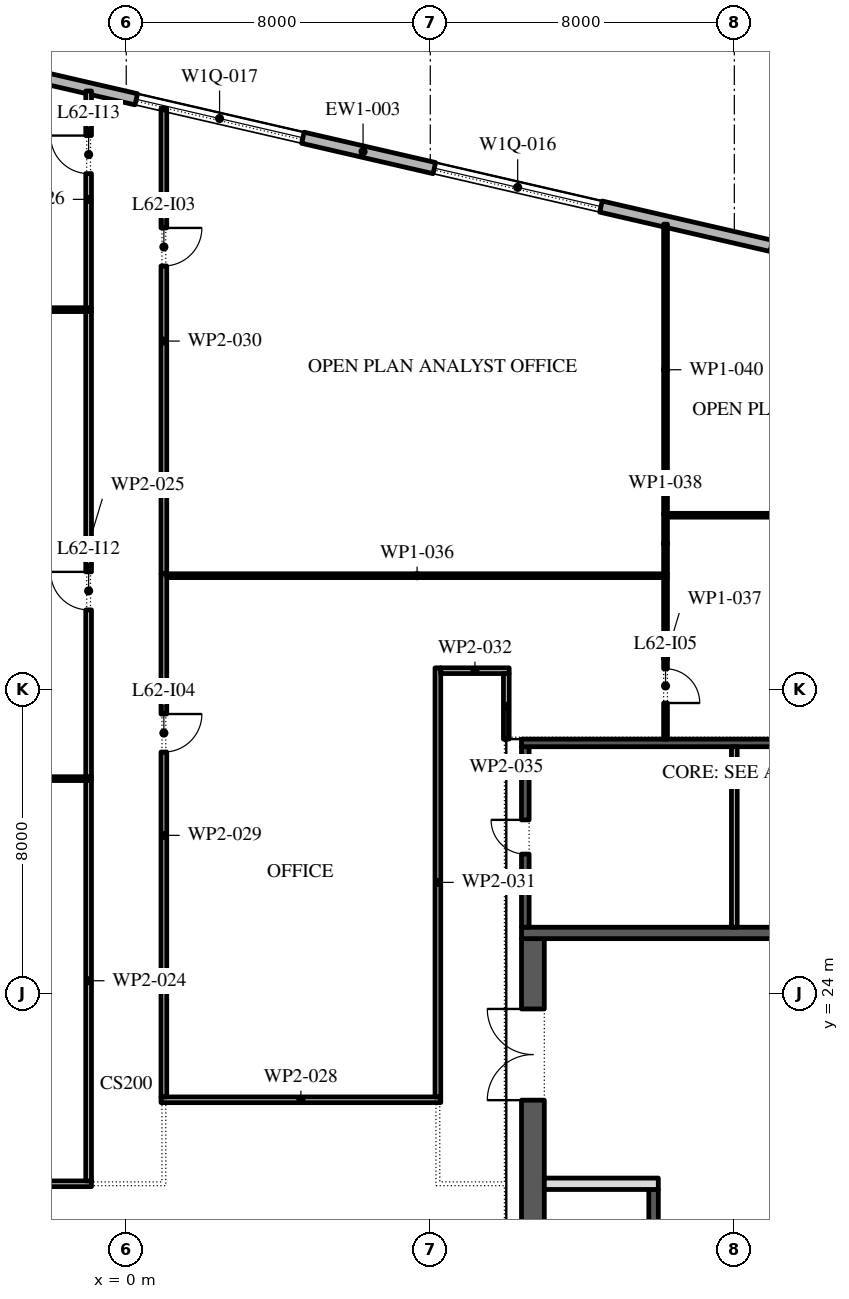
"""IFC4 building model, lengths in metres.
Left out: names, types, materials, properties, quantities, classifications, styles, units other than length and angle.
Written with IfcOpenShell. Run it as: python <this file> out.ifc"""

import sys

from ifc_helpers import new_model, si_unit, direction, frame, frame_2d, origin, place, context, subcontext, project, spatial, rectangle, extrude, element, fill, save


model = new_model("IFC4")
c1 = context("Model", 3, precision=1e-05, world=origin(), true_north=direction((0.0, 1.0)))
c2 = subcontext(c1, "Body", "Model", "MODEL_VIEW")
j1 = project(units=[si_unit("LENGTHUNIT", "METRE"), si_unit("PLANEANGLEUNIT", "RADIAN")], contexts=[c1])
p1 = place(None, origin())
s1 = spatial("IfcSite", under=j1, at=p1, CompositionType="ELEMENT")
p2 = place(p1, origin())
s2 = spatial("IfcBuilding", under=s1, at=p2, CompositionType="ELEMENT")
p3 = place(p2, frame((0.0, 0.0, 285.0)))
s3 = spatial("IfcBuildingStorey", under=s2, at=p3, CompositionType="ELEMENT", Elevation=285.0)
p4 = place(p3, frame((29.616, 40.758, 0.0), z_axis=(0.0, 0.0, 1.0), x_axis=(-0.974370532314, 0.224949029246, 0.0)))
e1 = element("IfcWall", 1, at=p4, inside=s3, PredefinedType="STANDARD", context=c2, shape_type="SweptSolid", body=[
    extrude(rectangle(XDim=48.0, YDim=0.3, at=frame_2d((24.0, 0.0))), origin(), (0.0, 0.0, 1.0), 4.0),
])
p5 = place(p4, frame((1.625, 0.0, 0.45)))
e2 = element("IfcOpeningElement", 2, at=p5, cuts=e1, PredefinedType="OPENING", context=c2, shape_type="SweptSolid", body=[
    extrude(rectangle(XDim=4.5, YDim=2.525, at=frame_2d((2.25, 1.262))), frame((0.0, 0.16, 0.0), z_axis=(0.0, -1.0, 0.0), x_axis=(1.0, 0.0, 0.0)), (0.0, 0.0, 1.0), 0.32),
])
p6 = place(p4, frame((10.575, 0.0, 0.0)))
e3 = element("IfcOpeningElement", 3, at=p6, cuts=e1, PredefinedType="OPENING", context=c2, shape_type="SweptSolid", body=[
    extrude(rectangle(XDim=2.4, YDim=3.5, at=frame_2d((1.2, 1.75))), frame((0.0, 0.16, 0.0), z_axis=(0.0, -1.0, 0.0), x_axis=(1.0, 0.0, 0.0)), (0.0, 0.0, 1.0), 0.32),
])
p7 = place(p4, frame((17.575, 0.0, 0.45)))
e4 = element("IfcOpeningElement", 4, at=p7, cuts=e1, PredefinedType="OPENING", context=c2, shape_type="SweptSolid", body=[
    extrude(rectangle(XDim=4.5, YDim=2.45, at=frame_2d((2.25, 1.225))), frame((0.0, 0.16, 0.0), z_axis=(0.0, -1.0, 0.0), x_axis=(1.0, 0.0, 0.0)), (0.0, 0.0, 1.0), 0.32),
])
p8 = place(p4, frame((25.625, 0.0, 0.45)))
e5 = element("IfcOpeningElement", 5, at=p8, cuts=e1, PredefinedType="OPENING", context=c2, shape_type="SweptSolid", body=[
    extrude(rectangle(XDim=4.5, YDim=2.45, at=frame_2d((2.25, 1.225))), frame((0.0, 0.16, 0.0), z_axis=(0.0, -1.0, 0.0), x_axis=(1.0, 0.0, 0.0)), (0.0, 0.0, 1.0), 0.32),
])
p9 = place(p4, frame((33.675, 0.0, 0.45)))
e6 = element("IfcOpeningElement", 6, at=p9, cuts=e1, PredefinedType="OPENING", context=c2, shape_type="SweptSolid", body=[
    extrude(rectangle(XDim=4.5, YDim=2.45, at=frame_2d((2.25, 1.225))), frame((0.0, 0.16, 0.0), z_axis=(0.0, -1.0, 0.0), x_axis=(1.0, 0.0, 0.0)), (0.0, 0.0, 1.0), 0.32),
])
p10 = place(p4, frame((42.775, 0.0, 0.0)))
e7 = element("IfcOpeningElement", 7, at=p10, cuts=e1, PredefinedType="OPENING", context=c2, shape_type="SweptSolid", body=[
    extrude(rectangle(XDim=2.4, YDim=3.5, at=frame_2d((1.2, 1.75))), frame((0.0, 0.16, 0.0), z_axis=(0.0, -1.0, 0.0), x_axis=(1.0, 0.0, 0.0)), (0.0, 0.0, 1.0), 0.32),
])
p11 = place(p3, frame((10.7, -2.45, 0.0), z_axis=(0.0, 0.0, 1.0), x_axis=(0.0, 1.0, 0.0)))
e8 = element("IfcWall", 8, at=p11, inside=s3, PredefinedType="SHEAR", context=c2, shape_type="SweptSolid", body=[
    extrude(rectangle(XDim=27.9, YDim=0.6, at=frame_2d((13.95, 0.0))), origin(), (0.0, 0.0, 1.0), 4.0),
])
p12 = place(p11, frame((23.65, 0.0, 0.0)))
e9 = element("IfcOpeningElement", 9, at=p12, cuts=e8, PredefinedType="OPENING", context=c2, shape_type="SweptSolid", body=[
    extrude(rectangle(XDim=2.4, YDim=2.1, at=frame_2d((1.2, 1.05))), frame((0.0, 0.31, 0.0), z_axis=(0.0, -1.0, 0.0), x_axis=(1.0, 0.0, 0.0)), (0.0, 0.0, 1.0), 0.62),
])
p13 = place(p11, frame((1.087, 0.0, 0.0)))
e10 = element("IfcOpeningElement", 10, at=p13, cuts=e8, PredefinedType="OPENING", context=c2, shape_type="SweptSolid", body=[
    extrude(rectangle(XDim=0.9, YDim=2.1, at=frame_2d((0.45, 1.05))), frame((0.0, 0.31, 0.0), z_axis=(0.0, -1.0, 0.0), x_axis=(1.0, 0.0, 0.0)), (0.0, 0.0, 1.0), 0.62),
])
p14 = place(p11, frame((4.262, 0.0, 0.0)))
e11 = element("IfcOpeningElement", 11, at=p14, cuts=e8, PredefinedType="OPENING", context=c2, shape_type="SweptSolid", body=[
    extrude(rectangle(XDim=1.0, YDim=2.1, at=frame_2d((0.5, 1.05))), frame((0.0, 0.31, 0.0), z_axis=(0.0, -1.0, 0.0), x_axis=(1.0, 0.0, 0.0)), (0.0, 0.0, 1.0), 0.62),
])
p15 = place(p3, frame((10.4, 25.6, 0.0), z_axis=(0.0, 0.0, 1.0), x_axis=(1.0, 0.0, 0.0)))
e12 = element("IfcWall", 12, at=p15, inside=s3, PredefinedType="SHEAR", context=c2, shape_type="SweptSolid", body=[
    extrude(rectangle(XDim=11.2, YDim=0.3, at=frame_2d((5.6, 0.0))), origin(), (0.0, 0.0, 1.0), 4.0),
])
p16 = place(p3, frame((13.875, -2.45, 0.0), z_axis=(0.0, 0.0, 1.0), x_axis=(0.0, 1.0, 0.0)))
e13 = element("IfcWall", 13, at=p16, inside=s3, PredefinedType="SHEAR", context=c2, shape_type="SweptSolid", body=[
    extrude(rectangle(XDim=21.3, YDim=0.25, at=frame_2d((10.65, 0.0))), origin(), (0.0, 0.0, 1.0), 4.0),
])
p17 = place(p16, frame((16.261, 0.0, 0.0)))
e14 = element("IfcOpeningElement", 14, at=p17, cuts=e13, PredefinedType="OPENING", context=c2, shape_type="SweptSolid", body=[
    extrude(rectangle(XDim=0.9, YDim=2.1, at=frame_2d((0.45, 1.05))), frame((0.0, 0.135, 0.0), z_axis=(0.0, -1.0, 0.0), x_axis=(1.0, 0.0, 0.0)), (0.0, 0.0, 1.0), 0.27),
])
p18 = place(p16, frame((19.325, 0.0, 0.0)))
e15 = element("IfcOpeningElement", 15, at=p18, cuts=e13, PredefinedType="OPENING", context=c2, shape_type="SweptSolid", body=[
    extrude(rectangle(XDim=0.9, YDim=2.1, at=frame_2d((0.45, 1.05))), frame((0.0, 0.135, 0.0), z_axis=(0.0, -1.0, 0.0), x_axis=(1.0, 0.0, 0.0)), (0.0, 0.0, 1.0), 0.27),
])
p19 = place(p16, frame((6.971, 0.0, 0.0)))
e16 = element("IfcOpeningElement", 16, at=p19, cuts=e13, PredefinedType="OPENING", context=c2, shape_type="SweptSolid", body=[
    extrude(rectangle(XDim=1.1, YDim=2.1, at=frame_2d((0.55, 1.05))), frame((0.0, 0.135, 0.0), z_axis=(0.0, -1.0, 0.0), x_axis=(1.0, 0.0, 0.0)), (0.0, 0.0, 1.0), 0.27),
])
p20 = place(p16, frame((9.114, 0.0, 0.0)))
e17 = element("IfcOpeningElement", 17, at=p20, cuts=e13, PredefinedType="OPENING", context=c2, shape_type="SweptSolid", body=[
    extrude(rectangle(XDim=1.1, YDim=2.1, at=frame_2d((0.55, 1.05))), frame((0.0, 0.135, 0.0), z_axis=(0.0, -1.0, 0.0), x_axis=(1.0, 0.0, 0.0)), (0.0, 0.0, 1.0), 0.27),
])
p21 = place(p16, frame((11.257, 0.0, 0.0)))
e18 = element("IfcOpeningElement", 18, at=p21, cuts=e13, PredefinedType="OPENING", context=c2, shape_type="SweptSolid", body=[
    extrude(rectangle(XDim=1.1, YDim=2.1, at=frame_2d((0.55, 1.05))), frame((0.0, 0.135, 0.0), z_axis=(0.0, -1.0, 0.0), x_axis=(1.0, 0.0, 0.0)), (0.0, 0.0, 1.0), 0.27),
])
p22 = place(p16, frame((13.4, 0.0, 0.0)))
e19 = element("IfcOpeningElement", 19, at=p22, cuts=e13, PredefinedType="OPENING", context=c2, shape_type="SweptSolid", body=[
    extrude(rectangle(XDim=1.1, YDim=2.1, at=frame_2d((0.55, 1.05))), frame((0.0, 0.135, 0.0), z_axis=(0.0, -1.0, 0.0), x_axis=(1.0, 0.0, 0.0)), (0.0, 0.0, 1.0), 0.27),
])
p23 = place(p3, frame((11.0, 19.0, 0.0), z_axis=(0.0, 0.0, 1.0), x_axis=(1.0, 0.0, 0.0)))
e20 = element("IfcWall", 20, at=p23, inside=s3, PredefinedType="PARTITIONING", context=c2, shape_type="SweptSolid", body=[
    extrude(rectangle(XDim=3.0, YDim=0.3, at=frame_2d((1.5, 0.0))), origin(), (0.0, 0.0, 1.0), 4.0),
])
p24 = place(p3, frame((10.5, 25.75, 0.0), z_axis=(0.0, 0.0, 1.0), x_axis=(0.0, 1.0, 0.0)))
e21 = element("IfcWall", 21, at=p24, inside=s3, PredefinedType="SHEAR", context=c2, shape_type="SweptSolid", body=[
    extrude(rectangle(XDim=4.75, YDim=0.2, at=frame_2d((2.375, 0.0))), origin(), (0.0, 0.0, 1.0), 4.0),
])
p25 = place(p24, frame((1.925, 0.0, 0.0)))
e22 = element("IfcOpeningElement", 22, at=p25, cuts=e21, PredefinedType="OPENING", context=c2, shape_type="SweptSolid", body=[
    extrude(rectangle(XDim=0.9, YDim=2.1, at=frame_2d((0.45, 1.05))), frame((0.0, 0.11, 0.0), z_axis=(0.0, -1.0, 0.0), x_axis=(1.0, 0.0, 0.0)), (0.0, 0.0, 1.0), 0.22),
])
p26 = place(p3, frame((10.4, 30.6, 0.0), z_axis=(0.0, 0.0, 1.0), x_axis=(1.0, 0.0, 0.0)))
e23 = element("IfcWall", 23, at=p26, inside=s3, PredefinedType="SHEAR", context=c2, shape_type="SweptSolid", body=[
    extrude(rectangle(XDim=11.2, YDim=0.2, at=frame_2d((5.6, 0.0))), origin(), (0.0, 0.0, 1.0), 4.0),
])
p27 = place(p3, frame((16.0, 25.75, 0.0), z_axis=(0.0, 0.0, 1.0), x_axis=(0.0, 1.0, 0.0)))
e24 = element("IfcWall", 24, at=p27, inside=s3, PredefinedType="PARTITIONING", context=c2, shape_type="SweptSolid", body=[
    extrude(rectangle(XDim=4.75, YDim=0.15, at=frame_2d((2.375, 0.0))), origin(), (0.0, 0.0, 1.0), 4.0),
])
p28 = place(p3, frame((-9.29, 42.0, 0.0), z_axis=(0.0, 0.0, 1.0), x_axis=(1.0, 0.0, 0.0)))
e25 = element("IfcWall", 25, at=p28, inside=s3, PredefinedType="PARTITIONING", context=c2, shape_type="SweptSolid", body=[
    extrude(rectangle(XDim=8.375, YDim=0.1, at=frame_2d((4.188, 0.0))), origin(), (0.0, 0.0, 1.0), 4.0),
])
p29 = place(p3, frame((-8.275, 19.0, 0.0), z_axis=(0.0, 0.0, 1.0), x_axis=(1.0, 0.0, 0.0)))
e26 = element("IfcWall", 26, at=p29, inside=s3, PredefinedType="PARTITIONING", context=c2, shape_type="SweptSolid", body=[
    extrude(rectangle(XDim=7.36, YDim=0.15, at=frame_2d((3.68, 0.0))), origin(), (0.0, 0.0, 1.0), 4.0),
])
p30 = place(p3, frame((-8.125, 29.66, 0.0), z_axis=(0.0, 0.0, 1.0), x_axis=(1.0, 0.0, 0.0)))
e27 = element("IfcWall", 27, at=p30, inside=s3, PredefinedType="PARTITIONING", context=c2, shape_type="SweptSolid", body=[
    extrude(rectangle(XDim=7.21, YDim=0.1, at=frame_2d((3.605, 0.0))), origin(), (0.0, 0.0, 1.0), 4.0),
])
p31 = place(p3, frame((-0.99, 19.075, 0.0), z_axis=(0.0, 0.0, 1.0), x_axis=(0.0, 1.0, 0.0)))
e28 = element("IfcWall", 28, at=p31, inside=s3, PredefinedType="PARTITIONING", context=c2, shape_type="SweptSolid", body=[
    extrude(rectangle(XDim=10.535, YDim=0.15, at=frame_2d((5.268, 0.0))), origin(), (0.0, 0.0, 1.0), 4.0),
])
p32 = place(p3, frame((-0.99, 29.71, 0.0), z_axis=(0.0, 0.0, 1.0), x_axis=(0.0, 1.0, 0.0)))
e29 = element("IfcWall", 29, at=p32, inside=s3, PredefinedType="PARTITIONING", context=c2, shape_type="SweptSolid", body=[
    extrude(rectangle(XDim=12.24, YDim=0.15, at=frame_2d((6.12, 0.0))), origin(), (0.0, 0.0, 1.0), 4.0),
])
p33 = place(p32, frame((4.39, 0.0, 0.0)))
e30 = element("IfcOpeningElement", 30, at=p33, cuts=e29, PredefinedType="OPENING", context=c2, shape_type="SweptSolid", body=[
    extrude(rectangle(XDim=1.0, YDim=2.1, at=frame_2d((0.5, 1.05))), frame((0.0, 0.085, 0.0), z_axis=(0.0, -1.0, 0.0), x_axis=(1.0, 0.0, 0.0)), (0.0, 0.0, 1.0), 0.17),
])
p34 = place(p3, frame((-0.99, 42.05, 0.0), z_axis=(0.0, 0.0, 1.0), x_axis=(0.0, 1.0, 0.0)))
e31 = element("IfcWall", 31, at=p34, inside=s3, PredefinedType="PARTITIONING", context=c2, shape_type="SweptSolid", body=[
    extrude(rectangle(XDim=5.703, YDim=0.15, at=frame_2d((2.852, 0.0))), origin(), (0.0, 0.0, 1.0), 4.0),
])
p35 = place(p34, frame((3.53, 0.0, 0.0)))
e32 = element("IfcOpeningElement", 32, at=p35, cuts=e31, PredefinedType="OPENING", context=c2, shape_type="SweptSolid", body=[
    extrude(rectangle(XDim=1.0, YDim=2.1, at=frame_2d((0.5, 1.05))), frame((0.0, 0.085, 0.0), z_axis=(0.0, -1.0, 0.0), x_axis=(1.0, 0.0, 0.0)), (0.0, 0.0, 1.0), 0.17),
])
p36 = place(p3, frame((0.915, 21.21, 0.0), z_axis=(0.0, 0.0, 1.0), x_axis=(1.0, 0.0, 0.0)))
e33 = element("IfcWall", 33, at=p36, inside=s3, PredefinedType="PARTITIONING", context=c2, shape_type="SweptSolid", body=[
    extrude(rectangle(XDim=7.36, YDim=0.15, at=frame_2d((3.68, 0.0))), origin(), (0.0, 0.0, 1.0), 4.0),
])
p37 = place(p3, frame((0.99, 35.05, 0.0), z_axis=(0.0, 0.0, 1.0), x_axis=(0.0, -1.0, 0.0)))
e34 = element("IfcWall", 34, at=p37, inside=s3, PredefinedType="PARTITIONING", context=c2, shape_type="SweptSolid", body=[
    extrude(rectangle(XDim=13.765, YDim=0.15, at=frame_2d((6.883, 0.0))), origin(), (0.0, 0.0, 1.0), 4.0),
])
p38 = place(p37, frame((3.69, 0.0, 0.0)))
e35 = element("IfcOpeningElement", 35, at=p38, cuts=e34, PredefinedType="OPENING", context=c2, shape_type="SweptSolid", body=[
    extrude(rectangle(XDim=1.0, YDim=2.1, at=frame_2d((0.5, 1.05))), frame((0.0, 0.085, 0.0), z_axis=(0.0, -1.0, 0.0), x_axis=(1.0, 0.0, 0.0)), (0.0, 0.0, 1.0), 0.17),
])
p39 = place(p3, frame((0.99, 47.296, 0.0), z_axis=(0.0, 0.0, 1.0), x_axis=(0.0, -1.0, 0.0)))
e36 = element("IfcWall", 36, at=p39, inside=s3, PredefinedType="PARTITIONING", context=c2, shape_type="SweptSolid", body=[
    extrude(rectangle(XDim=12.246, YDim=0.15, at=frame_2d((6.123, 0.0))), origin(), (0.0, 0.0, 1.0), 4.0),
])
p40 = place(p39, frame((3.146, 0.0, 0.0)))
e37 = element("IfcOpeningElement", 37, at=p40, cuts=e36, PredefinedType="OPENING", context=c2, shape_type="SweptSolid", body=[
    extrude(rectangle(XDim=1.0, YDim=2.1, at=frame_2d((0.5, 1.05))), frame((0.0, 0.085, 0.0), z_axis=(0.0, -1.0, 0.0), x_axis=(1.0, 0.0, 0.0)), (0.0, 0.0, 1.0), 0.17),
])
p41 = place(p3, frame((8.2, 21.285, 0.0), z_axis=(0.0, 0.0, 1.0), x_axis=(0.0, 1.0, 0.0)))
e38 = element("IfcWall", 38, at=p41, inside=s3, PredefinedType="PARTITIONING", context=c2, shape_type="SweptSolid", body=[
    extrude(rectangle(XDim=11.29, YDim=0.15, at=frame_2d((5.645, 0.0))), origin(), (0.0, 0.0, 1.0), 4.0),
])
p42 = place(p3, frame((8.275, 32.5, 0.0), z_axis=(0.0, 0.0, 1.0), x_axis=(1.0, 0.0, 0.0)))
e39 = element("IfcWall", 39, at=p42, inside=s3, PredefinedType="PARTITIONING", context=c2, shape_type="SweptSolid", body=[
    extrude(rectangle(XDim=1.8, YDim=0.15, at=frame_2d((0.9, 0.0))), origin(), (0.0, 0.0, 1.0), 4.0),
])
p43 = place(p3, frame((10.0, 32.425, 0.0), z_axis=(0.0, 0.0, 1.0), x_axis=(0.0, -1.0, 0.0)))
e40 = element("IfcWall", 40, at=p43, inside=s3, PredefinedType="PARTITIONING", context=c2, shape_type="SweptSolid", body=[
    extrude(rectangle(XDim=1.725, YDim=0.15, at=frame_2d((0.863, 0.0))), origin(), (0.0, 0.0, 1.0), 4.0),
])
p44 = place(p3, frame((14.24, 35.0, 0.0), z_axis=(0.0, 0.0, 1.0), x_axis=(-1.0, 0.0, 0.0)))
e41 = element("IfcWall", 41, at=p44, inside=s3, PredefinedType="PARTITIONING", context=c2, shape_type="SweptSolid", body=[
    extrude(rectangle(XDim=13.175, YDim=0.1, at=frame_2d((6.587, 0.0))), origin(), (0.0, 0.0, 1.0), 4.0),
])
p45 = place(p3, frame((14.19, 34.95, 0.0), z_axis=(0.0, 0.0, 1.0), x_axis=(0.0, -1.0, 0.0)))
e42 = element("IfcWall", 42, at=p45, inside=s3, PredefinedType="PARTITIONING", context=c2, shape_type="SweptSolid", body=[
    extrude(rectangle(XDim=4.25, YDim=0.1, at=frame_2d((2.125, 0.0))), origin(), (0.0, 0.0, 1.0), 4.0),
])
p46 = place(p45, frame((2.4, 0.0, 0.0)))
e43 = element("IfcOpeningElement", 43, at=p46, cuts=e42, PredefinedType="OPENING", context=c2, shape_type="SweptSolid", body=[
    extrude(rectangle(XDim=0.9, YDim=2.1, at=frame_2d((0.45, 1.05))), frame((0.0, 0.06, 0.0), z_axis=(0.0, -1.0, 0.0), x_axis=(1.0, 0.0, 0.0)), (0.0, 0.0, 1.0), 0.12),
])
p47 = place(p3, frame((14.19, 36.64, 0.0), z_axis=(0.0, 0.0, 1.0), x_axis=(0.0, -1.0, 0.0)))
e44 = element("IfcWall", 44, at=p47, inside=s3, PredefinedType="PARTITIONING", context=c2, shape_type="SweptSolid", body=[
    extrude(rectangle(XDim=1.59, YDim=0.1, at=frame_2d((0.795, 0.0))), origin(), (0.0, 0.0, 1.0), 4.0),
])
p48 = place(p3, frame((14.24, 36.59, 0.0), z_axis=(0.0, 0.0, 1.0), x_axis=(1.0, 0.0, 0.0)))
e45 = element("IfcWall", 45, at=p48, inside=s3, PredefinedType="PARTITIONING", context=c2, shape_type="SweptSolid", body=[
    extrude(rectangle(XDim=7.76, YDim=0.1, at=frame_2d((3.88, 0.0))), origin(), (0.0, 0.0, 1.0), 4.0),
])
p49 = place(p3, frame((14.19, 44.248, 0.0), z_axis=(0.0, 0.0, 1.0), x_axis=(0.0, -1.0, 0.0)))
e46 = element("IfcWall", 46, at=p49, inside=s3, PredefinedType="PARTITIONING", context=c2, shape_type="SweptSolid", body=[
    extrude(rectangle(XDim=7.658, YDim=0.1, at=frame_2d((3.829, 0.0))), origin(), (0.0, 0.0, 1.0), 4.0),
])
p50 = place(p7, origin())
e47 = element("IfcWindow", 47, at=p50, inside=s3, PartitioningType="DOUBLE_PANEL_VERTICAL", PredefinedType="WINDOW", context=c2, shape_type="SweptSolid", body=[
    extrude(rectangle(XDim=4.5, YDim=2.45, at=frame_2d((2.25, 1.225))), frame((0.0, 0.03, 0.0), z_axis=(0.0, -1.0, 0.0), x_axis=(1.0, 0.0, 0.0)), (0.0, 0.0, 1.0), 0.06),
])
fill(e4, e47)
p51 = place(p8, origin())
e48 = element("IfcWindow", 48, at=p51, inside=s3, PartitioningType="DOUBLE_PANEL_VERTICAL", PredefinedType="WINDOW", context=c2, shape_type="SweptSolid", body=[
    extrude(rectangle(XDim=4.5, YDim=2.45, at=frame_2d((2.25, 1.225))), frame((0.0, 0.03, 0.0), z_axis=(0.0, -1.0, 0.0), x_axis=(1.0, 0.0, 0.0)), (0.0, 0.0, 1.0), 0.06),
])
fill(e5, e48)
p52 = place(p12, origin())
e49 = element("IfcDoor", 49, at=p52, inside=s3, OperationType="DOUBLE_DOOR_SINGLE_SWING", PredefinedType="DOOR", context=c2, shape_type="SweptSolid", body=[
    extrude(rectangle(XDim=2.4, YDim=2.1, at=frame_2d((1.2, 1.05))), frame((0.0, 0.025, 0.0), z_axis=(0.0, -1.0, 0.0), x_axis=(1.0, 0.0, 0.0)), (0.0, 0.0, 1.0), 0.05),
])
fill(e9, e49)
p53 = place(p25, origin())
e50 = element("IfcDoor", 50, at=p53, inside=s3, OperationType="SINGLE_SWING_LEFT", PredefinedType="DOOR", context=c2, shape_type="SweptSolid", body=[
    extrude(rectangle(XDim=0.9, YDim=2.1, at=frame_2d((0.45, 1.05))), frame((0.0, -0.05, 0.0), z_axis=(0.0, -1.0, 0.0), x_axis=(1.0, 0.0, 0.0)), (0.0, 0.0, 1.0), 0.05),
])
fill(e22, e50)
p54 = place(p40, origin())
e51 = element("IfcDoor", 51, at=p54, inside=s3, OperationType="SINGLE_SWING_RIGHT", PredefinedType="DOOR", context=c2, shape_type="SweptSolid", body=[
    extrude(rectangle(XDim=1.0, YDim=2.1, at=frame_2d((0.5, 1.05))), frame((0.0, 0.025, 0.0), z_axis=(0.0, -1.0, 0.0), x_axis=(1.0, 0.0, 0.0)), (0.0, 0.0, 1.0), 0.05),
])
fill(e37, e51)
p55 = place(p38, origin())
e52 = element("IfcDoor", 52, at=p55, inside=s3, OperationType="SINGLE_SWING_RIGHT", PredefinedType="DOOR", context=c2, shape_type="SweptSolid", body=[
    extrude(rectangle(XDim=1.0, YDim=2.1, at=frame_2d((0.5, 1.05))), frame((0.0, 0.025, 0.0), z_axis=(0.0, -1.0, 0.0), x_axis=(1.0, 0.0, 0.0)), (0.0, 0.0, 1.0), 0.05),
])
fill(e35, e52)
p56 = place(p46, origin())
e53 = element("IfcDoor", 53, at=p56, inside=s3, OperationType="SINGLE_SWING_LEFT", PredefinedType="DOOR", context=c2, shape_type="SweptSolid", body=[
    extrude(rectangle(XDim=0.9, YDim=2.1, at=frame_2d((0.45, 1.05))), frame((0.0, 0.025, 0.0), z_axis=(0.0, -1.0, 0.0), x_axis=(1.0, 0.0, 0.0)), (0.0, 0.0, 1.0), 0.05),
])
fill(e43, e53)
p57 = place(p33, origin())
e54 = element("IfcDoor", 54, at=p57, inside=s3, OperationType="SINGLE_SWING_LEFT", PredefinedType="DOOR", context=c2, shape_type="SweptSolid", body=[
    extrude(rectangle(XDim=1.0, YDim=2.1, at=frame_2d((0.5, 1.05))), frame((0.0, 0.025, 0.0), z_axis=(0.0, -1.0, 0.0), x_axis=(1.0, 0.0, 0.0)), (0.0, 0.0, 1.0), 0.05),
])
fill(e30, e54)
p58 = place(p35, origin())
e55 = element("IfcDoor", 55, at=p58, inside=s3, OperationType="SINGLE_SWING_LEFT", PredefinedType="DOOR", context=c2, shape_type="SweptSolid", body=[
    extrude(rectangle(XDim=1.0, YDim=2.1, at=frame_2d((0.5, 1.05))), frame((0.0, 0.025, 0.0), z_axis=(0.0, -1.0, 0.0), x_axis=(1.0, 0.0, 0.0)), (0.0, 0.0, 1.0), 0.05),
])
fill(e32, e55)
save(model, sys.argv[1])
